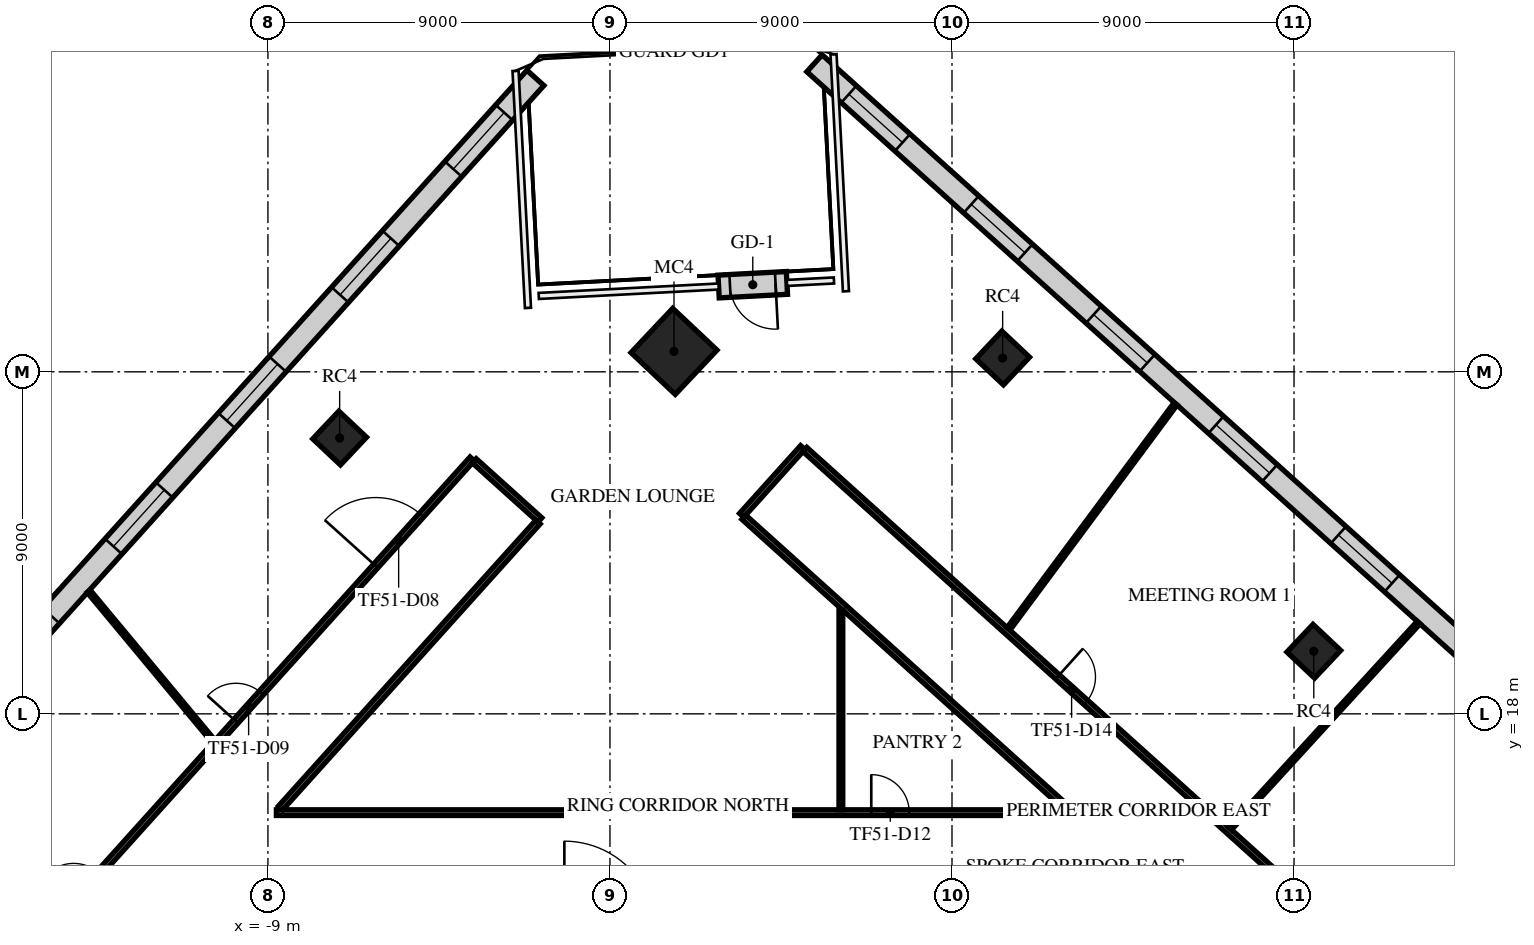
"""IFC4 building model, lengths in metres.
Left out: names, types, materials, properties, quantities, classifications, styles, units other than length and angle.
Written with IfcOpenShell. Run it as: python <this file> out.ifc"""

import sys

from ifc_helpers import new_model, si_unit, direction, frame, frame_2d, origin, origin_2d, place, context, subcontext, project, spatial, rectangle, extrude, element, fill, save


model = new_model("IFC4")
c1 = context("Model", 3, precision=1e-05, world=origin(), true_north=direction((0.0, 1.0)))
c2 = subcontext(c1, "Body", "Model", "MODEL_VIEW")
j1 = project(units=[si_unit("LENGTHUNIT", "METRE"), si_unit("PLANEANGLEUNIT", "RADIAN")], contexts=[c1])
p1 = place(None, origin())
s1 = spatial("IfcSite", under=j1, at=p1, CompositionType="ELEMENT")
p2 = place(p1, origin())
s2 = spatial("IfcBuilding", under=s1, at=p2, CompositionType="ELEMENT")
p3 = place(p2, frame((0.0, 0.0, 217.3)))
s3 = spatial("IfcBuildingStorey", under=s2, at=p3, CompositionType="ELEMENT", Elevation=217.3)
p4 = place(p3, frame((1.685, 27.538, 0.0), z_axis=(0.0, 0.0, 1.0), x_axis=(0.685916152371, 0.727680583715, 0.0)))
e1 = element("IfcColumn", 1, at=p4, inside=s3, PredefinedType="COLUMN", context=c2, shape_type="SweptSolid", body=[
    extrude(rectangle(XDim=1.6, YDim=1.6, at=origin_2d()), origin(), (0.0, 0.0, 1.0), 4.0),
])
for number, where, z_axis, x_axis in (
    (2, (-7.113, 25.257, 0.0), (0.0, 0.0, 1.0), (0.686, 0.728, 0.0)),
    (3, (18.52, 19.647, 0.0), (0.0, 0.0, 1.0), (0.686, 0.728, 0.0)),
    (4, (10.333, 27.364, 0.0), (0.0, 0.0, 1.0), (0.686, 0.728, 0.0)),
):
    element("IfcColumn", number, at=place(p3, frame(where, z_axis=z_axis, x_axis=x_axis)), inside=s3, PredefinedType="COLUMN", context=c2, shape_type="SweptSolid", body=[
        extrude(rectangle(XDim=1.0, YDim=1.0, at=origin_2d()), origin(), (0.0, 0.0, 1.0), 4.0),
    ])
p5 = place(p3, frame((-1.962, 34.735, 0.0), z_axis=(0.0, 0.0, 1.0), x_axis=(-0.669133181838, -0.743142506497, 0.0)))
e5 = element("IfcWall", 5, at=p5, inside=s3, PredefinedType="STANDARD", context=c2, shape_type="SweptSolid", body=[
    extrude(rectangle(XDim=49.0, YDim=0.6, at=frame_2d((24.5, 0.0))), origin(), (0.0, 0.0, 1.0), 3.62),
])
p6 = place(p5, frame((1.227, 0.0, 0.9)))
e6 = element("IfcOpeningElement", 6, at=p6, cuts=e5, PredefinedType="OPENING", context=c2, shape_type="SweptSolid", body=[
    extrude(rectangle(XDim=2.0, YDim=2.1, at=frame_2d((1.0, 1.05))), frame((0.0, 0.31, 0.0), z_axis=(0.0, -1.0, 0.0), x_axis=(1.0, 0.0, 0.0)), (0.0, 0.0, 1.0), 0.62),
])
p7 = place(p5, frame((5.682, 0.0, 0.9)))
e7 = element("IfcOpeningElement", 7, at=p7, cuts=e5, PredefinedType="OPENING", context=c2, shape_type="SweptSolid", body=[
    extrude(rectangle(XDim=2.0, YDim=2.1, at=frame_2d((1.0, 1.05))), frame((0.0, 0.31, 0.0), z_axis=(0.0, -1.0, 0.0), x_axis=(1.0, 0.0, 0.0)), (0.0, 0.0, 1.0), 0.62),
])
p8 = place(p5, frame((10.136, 0.0, 0.9)))
e8 = element("IfcOpeningElement", 8, at=p8, cuts=e5, PredefinedType="OPENING", context=c2, shape_type="SweptSolid", body=[
    extrude(rectangle(XDim=2.0, YDim=2.1, at=frame_2d((1.0, 1.05))), frame((0.0, 0.31, 0.0), z_axis=(0.0, -1.0, 0.0), x_axis=(1.0, 0.0, 0.0)), (0.0, 0.0, 1.0), 0.62),
])
p9 = place(p5, frame((14.591, 0.0, 0.9)))
e9 = element("IfcOpeningElement", 9, at=p9, cuts=e5, PredefinedType="OPENING", context=c2, shape_type="SweptSolid", body=[
    extrude(rectangle(XDim=2.0, YDim=2.1, at=frame_2d((1.0, 1.05))), frame((0.0, 0.31, 0.0), z_axis=(0.0, -1.0, 0.0), x_axis=(1.0, 0.0, 0.0)), (0.0, 0.0, 1.0), 0.62),
])
p10 = place(p5, frame((19.045, 0.0, 0.9)))
e10 = element("IfcOpeningElement", 10, at=p10, cuts=e5, PredefinedType="OPENING", context=c2, shape_type="SweptSolid", body=[
    extrude(rectangle(XDim=2.0, YDim=2.1, at=frame_2d((1.0, 1.05))), frame((0.0, 0.31, 0.0), z_axis=(0.0, -1.0, 0.0), x_axis=(1.0, 0.0, 0.0)), (0.0, 0.0, 1.0), 0.62),
])
p11 = place(p5, frame((23.5, 0.0, 0.9)))
e11 = element("IfcOpeningElement", 11, at=p11, cuts=e5, PredefinedType="OPENING", context=c2, shape_type="SweptSolid", body=[
    extrude(rectangle(XDim=2.0, YDim=2.1, at=frame_2d((1.0, 1.05))), frame((0.0, 0.31, 0.0), z_axis=(0.0, -1.0, 0.0), x_axis=(1.0, 0.0, 0.0)), (0.0, 0.0, 1.0), 0.62),
])
p12 = place(p5, frame((27.955, 0.0, 0.9)))
e12 = element("IfcOpeningElement", 12, at=p12, cuts=e5, PredefinedType="OPENING", context=c2, shape_type="SweptSolid", body=[
    extrude(rectangle(XDim=2.0, YDim=2.1, at=frame_2d((1.0, 1.05))), frame((0.0, 0.31, 0.0), z_axis=(0.0, -1.0, 0.0), x_axis=(1.0, 0.0, 0.0)), (0.0, 0.0, 1.0), 0.62),
])
p13 = place(p5, frame((32.409, 0.0, 0.9)))
e13 = element("IfcOpeningElement", 13, at=p13, cuts=e5, PredefinedType="OPENING", context=c2, shape_type="SweptSolid", body=[
    extrude(rectangle(XDim=2.0, YDim=2.1, at=frame_2d((1.0, 1.05))), frame((0.0, 0.31, 0.0), z_axis=(0.0, -1.0, 0.0), x_axis=(1.0, 0.0, 0.0)), (0.0, 0.0, 1.0), 0.62),
])
p14 = place(p5, frame((36.864, 0.0, 0.9)))
e14 = element("IfcOpeningElement", 14, at=p14, cuts=e5, PredefinedType="OPENING", context=c2, shape_type="SweptSolid", body=[
    extrude(rectangle(XDim=2.0, YDim=2.1, at=frame_2d((1.0, 1.05))), frame((0.0, 0.31, 0.0), z_axis=(0.0, -1.0, 0.0), x_axis=(1.0, 0.0, 0.0)), (0.0, 0.0, 1.0), 0.62),
])
p15 = place(p5, frame((41.318, 0.0, 0.9)))
e15 = element("IfcOpeningElement", 15, at=p15, cuts=e5, PredefinedType="OPENING", context=c2, shape_type="SweptSolid", body=[
    extrude(rectangle(XDim=2.0, YDim=2.1, at=frame_2d((1.0, 1.05))), frame((0.0, 0.31, 0.0), z_axis=(0.0, -1.0, 0.0), x_axis=(1.0, 0.0, 0.0)), (0.0, 0.0, 1.0), 0.62),
])
p16 = place(p5, frame((45.773, 0.0, 0.9)))
e16 = element("IfcOpeningElement", 16, at=p16, cuts=e5, PredefinedType="OPENING", context=c2, shape_type="SweptSolid", body=[
    extrude(rectangle(XDim=2.0, YDim=2.1, at=frame_2d((1.0, 1.05))), frame((0.0, 0.31, 0.0), z_axis=(0.0, -1.0, 0.0), x_axis=(1.0, 0.0, 0.0)), (0.0, 0.0, 1.0), 0.62),
])
p17 = place(p3, frame((34.365, 9.023, 0.0), z_axis=(0.0, 0.0, 1.0), x_axis=(-0.743146896498, 0.66912830625, 0.0)))
e17 = element("IfcWall", 17, at=p17, inside=s3, PredefinedType="STANDARD", context=c2, shape_type="SweptSolid", body=[
    extrude(rectangle(XDim=39.0, YDim=0.6, at=frame_2d((19.5, 0.0))), origin(), (0.0, 0.0, 1.0), 3.62),
])
p18 = place(p17, frame((1.217, 0.0, 0.9)))
e18 = element("IfcOpeningElement", 18, at=p18, cuts=e17, PredefinedType="OPENING", context=c2, shape_type="SweptSolid", body=[
    extrude(rectangle(XDim=1.9, YDim=2.1, at=frame_2d((0.95, 1.05))), frame((0.0, 0.31, 0.0), z_axis=(0.0, -1.0, 0.0), x_axis=(1.0, 0.0, 0.0)), (0.0, 0.0, 1.0), 0.62),
])
p19 = place(p17, frame((5.55, 0.0, 0.9)))
e19 = element("IfcOpeningElement", 19, at=p19, cuts=e17, PredefinedType="OPENING", context=c2, shape_type="SweptSolid", body=[
    extrude(rectangle(XDim=1.9, YDim=2.1, at=frame_2d((0.95, 1.05))), frame((0.0, 0.31, 0.0), z_axis=(0.0, -1.0, 0.0), x_axis=(1.0, 0.0, 0.0)), (0.0, 0.0, 1.0), 0.62),
])
p20 = place(p17, frame((9.883, 0.0, 0.9)))
e20 = element("IfcOpeningElement", 20, at=p20, cuts=e17, PredefinedType="OPENING", context=c2, shape_type="SweptSolid", body=[
    extrude(rectangle(XDim=1.9, YDim=2.1, at=frame_2d((0.95, 1.05))), frame((0.0, 0.31, 0.0), z_axis=(0.0, -1.0, 0.0), x_axis=(1.0, 0.0, 0.0)), (0.0, 0.0, 1.0), 0.62),
])
p21 = place(p17, frame((14.217, 0.0, 0.9)))
e21 = element("IfcOpeningElement", 21, at=p21, cuts=e17, PredefinedType="OPENING", context=c2, shape_type="SweptSolid", body=[
    extrude(rectangle(XDim=1.9, YDim=2.1, at=frame_2d((0.95, 1.05))), frame((0.0, 0.31, 0.0), z_axis=(0.0, -1.0, 0.0), x_axis=(1.0, 0.0, 0.0)), (0.0, 0.0, 1.0), 0.62),
])
p22 = place(p17, frame((18.55, 0.0, 0.9)))
e22 = element("IfcOpeningElement", 22, at=p22, cuts=e17, PredefinedType="OPENING", context=c2, shape_type="SweptSolid", body=[
    extrude(rectangle(XDim=1.9, YDim=2.1, at=frame_2d((0.95, 1.05))), frame((0.0, 0.31, 0.0), z_axis=(0.0, -1.0, 0.0), x_axis=(1.0, 0.0, 0.0)), (0.0, 0.0, 1.0), 0.62),
])
p23 = place(p17, frame((22.883, 0.0, 0.9)))
e23 = element("IfcOpeningElement", 23, at=p23, cuts=e17, PredefinedType="OPENING", context=c2, shape_type="SweptSolid", body=[
    extrude(rectangle(XDim=1.9, YDim=2.1, at=frame_2d((0.95, 1.05))), frame((0.0, 0.31, 0.0), z_axis=(0.0, -1.0, 0.0), x_axis=(1.0, 0.0, 0.0)), (0.0, 0.0, 1.0), 0.62),
])
p24 = place(p17, frame((27.217, 0.0, 0.9)))
e24 = element("IfcOpeningElement", 24, at=p24, cuts=e17, PredefinedType="OPENING", context=c2, shape_type="SweptSolid", body=[
    extrude(rectangle(XDim=1.9, YDim=2.1, at=frame_2d((0.95, 1.05))), frame((0.0, 0.31, 0.0), z_axis=(0.0, -1.0, 0.0), x_axis=(1.0, 0.0, 0.0)), (0.0, 0.0, 1.0), 0.62),
])
p25 = place(p17, frame((31.55, 0.0, 0.9)))
e25 = element("IfcOpeningElement", 25, at=p25, cuts=e17, PredefinedType="OPENING", context=c2, shape_type="SweptSolid", body=[
    extrude(rectangle(XDim=1.9, YDim=2.1, at=frame_2d((0.95, 1.05))), frame((0.0, 0.31, 0.0), z_axis=(0.0, -1.0, 0.0), x_axis=(1.0, 0.0, 0.0)), (0.0, 0.0, 1.0), 0.62),
])
p26 = place(p17, frame((35.883, 0.0, 0.9)))
e26 = element("IfcOpeningElement", 26, at=p26, cuts=e17, PredefinedType="OPENING", context=c2, shape_type="SweptSolid", body=[
    extrude(rectangle(XDim=1.9, YDim=2.1, at=frame_2d((0.95, 1.05))), frame((0.0, 0.31, 0.0), z_axis=(0.0, -1.0, 0.0), x_axis=(1.0, 0.0, 0.0)), (0.0, 0.0, 1.0), 0.62),
])
p27 = place(p3, frame((4.656, 29.339, 0.0), z_axis=(0.0, 0.0, 1.0), x_axis=(-0.998635754819, -0.052217135082, 0.0)))
e27 = element("IfcWall", 27, at=p27, inside=s3, PredefinedType="STANDARD", context=c2, shape_type="SweptSolid", body=[
    extrude(rectangle(XDim=1.8, YDim=0.6, at=frame_2d((0.9, 0.0))), origin(), (0.0, 0.0, 1.0), 3.62),
])
p28 = place(p27, frame((0.3, 0.0, 0.0)))
e28 = element("IfcOpeningElement", 28, at=p28, cuts=e27, PredefinedType="OPENING", context=c2, shape_type="SweptSolid", body=[
    extrude(rectangle(XDim=1.2, YDim=2.4, at=frame_2d((0.6, 1.2))), frame((0.0, 0.31, 0.0), z_axis=(0.0, -1.0, 0.0), x_axis=(1.0, 0.0, 0.0)), (0.0, 0.0, 1.0), 0.62),
])
p29 = place(p3, frame((-24.952, 1.024, 0.0), z_axis=(0.0, 0.0, 1.0), x_axis=(0.66912723064, 0.743147864974, 0.0)))
e29 = element("IfcWall", 29, at=p29, inside=s3, PredefinedType="PARTITIONING", context=c2, shape_type="SweptSolid", body=[
    extrude(rectangle(XDim=31.871, YDim=0.15, at=frame_2d((15.936, 0.0))), origin(), (0.0, 0.0, 1.0), 3.17),
])
p30 = place(p29, frame((16.202, 0.0, 0.0)))
e30 = element("IfcOpeningElement", 30, at=p30, cuts=e29, PredefinedType="OPENING", context=c2, shape_type="SweptSolid", body=[
    extrude(rectangle(XDim=1.0, YDim=2.1, at=frame_2d((0.5, 1.05))), frame((0.0, 0.085, 0.0), z_axis=(0.0, -1.0, 0.0), x_axis=(1.0, 0.0, 0.0)), (0.0, 0.0, 1.0), 0.17),
])
p31 = place(p29, frame((28.08, 0.0, 0.0)))
e31 = element("IfcOpeningElement", 31, at=p31, cuts=e29, PredefinedType="OPENING", context=c2, shape_type="SweptSolid", body=[
    extrude(rectangle(XDim=1.8, YDim=2.1, at=frame_2d((0.9, 1.05))), frame((0.0, 0.085, 0.0), z_axis=(0.0, -1.0, 0.0), x_axis=(1.0, 0.0, 0.0)), (0.0, 0.0, 1.0), 0.17),
])
p32 = place(p29, frame((22.58, 0.0, 0.0)))
e32 = element("IfcOpeningElement", 32, at=p32, cuts=e29, PredefinedType="OPENING", context=c2, shape_type="SweptSolid", body=[
    extrude(rectangle(XDim=1.0, YDim=2.1, at=frame_2d((0.5, 1.05))), frame((0.0, 0.085, 0.0), z_axis=(0.0, -1.0, 0.0), x_axis=(1.0, 0.0, 0.0)), (0.0, 0.0, 1.0), 0.17),
])
p33 = place(p3, frame((-8.778, 15.4, 0.0), z_axis=(0.0, 0.0, 1.0), x_axis=(1.0, 0.0, 0.0)))
e33 = element("IfcWall", 33, at=p33, inside=s3, PredefinedType="PARTITIONING", context=c2, shape_type="SweptSolid", body=[
    extrude(rectangle(XDim=20.934, YDim=0.15, at=frame_2d((10.467, 0.0))), origin(), (0.0, 0.0, 1.0), 3.17),
])
p34 = place(p33, frame((15.654, 0.0, 0.0)))
e34 = element("IfcOpeningElement", 34, at=p34, cuts=e33, PredefinedType="OPENING", context=c2, shape_type="SweptSolid", body=[
    extrude(rectangle(XDim=1.0, YDim=2.1, at=frame_2d((0.5, 1.05))), frame((0.0, 0.085, 0.0), z_axis=(0.0, -1.0, 0.0), x_axis=(1.0, 0.0, 0.0)), (0.0, 0.0, 1.0), 0.17),
])
p35 = place(p3, frame((-8.665, 15.525, 0.0), z_axis=(0.0, 0.0, 1.0), x_axis=(0.669084664521, 0.743186189123, 0.0)))
e35 = element("IfcWall", 35, at=p35, inside=s3, PredefinedType="PARTITIONING", context=c2, shape_type="SweptSolid", body=[
    extrude(rectangle(XDim=10.121, YDim=0.15, at=frame_2d((5.061, 0.0))), origin(), (0.0, 0.0, 1.0), 3.17),
])
p36 = place(p3, frame((-3.57, 24.659, 0.0), z_axis=(0.0, 0.0, 1.0), x_axis=(0.743059097408, -0.669225804761, 0.0)))
e36 = element("IfcWall", 36, at=p36, inside=s3, PredefinedType="PARTITIONING", context=c2, shape_type="SweptSolid", body=[
    extrude(rectangle(XDim=2.324, YDim=0.15, at=frame_2d((1.162, 0.0))), origin(), (0.0, 0.0, 1.0), 3.17),
])
p37 = place(p3, frame((3.466, 23.224, 0.0), z_axis=(0.0, 0.0, 1.0), x_axis=(0.669060256522, 0.743208162726, 0.0)))
e37 = element("IfcWall", 37, at=p37, inside=s3, PredefinedType="PARTITIONING", context=c2, shape_type="SweptSolid", body=[
    extrude(rectangle(XDim=2.4, YDim=0.15, at=frame_2d((1.2, 0.0))), origin(), (0.0, 0.0, 1.0), 3.62),
])
p38 = place(p3, frame((3.522, 23.174, 0.0), z_axis=(0.0, 0.0, 1.0), x_axis=(0.743165539408, -0.669107600492, 0.0)))
e38 = element("IfcWall", 38, at=p38, inside=s3, PredefinedType="PARTITIONING", context=c2, shape_type="SweptSolid", body=[
    extrude(rectangle(XDim=11.423, YDim=0.15, at=frame_2d((5.711, 0.0))), origin(), (0.0, 0.0, 1.0), 3.17),
])
p39 = place(p3, frame((5.128, 24.958, 0.0), z_axis=(0.0, 0.0, 1.0), x_axis=(0.743144813636, -0.66913061951, 0.0)))
e39 = element("IfcWall", 39, at=p39, inside=s3, PredefinedType="PARTITIONING", context=c2, shape_type="SweptSolid", body=[
    extrude(rectangle(XDim=25.854, YDim=0.15, at=frame_2d((12.927, 0.0))), origin(), (0.0, 0.0, 1.0), 3.17),
])
p40 = place(p39, frame((8.946, 0.0, 0.0)))
e40 = element("IfcOpeningElement", 40, at=p40, cuts=e39, PredefinedType="OPENING", context=c2, shape_type="SweptSolid", body=[
    extrude(rectangle(XDim=1.0, YDim=2.1, at=frame_2d((0.5, 1.05))), frame((0.0, 0.085, 0.0), z_axis=(0.0, -1.0, 0.0), x_axis=(1.0, 0.0, 0.0)), (0.0, 0.0, 1.0), 0.17),
])
p41 = place(p39, frame((20.29, 0.0, 0.0)))
e41 = element("IfcOpeningElement", 41, at=p41, cuts=e39, PredefinedType="OPENING", context=c2, shape_type="SweptSolid", body=[
    extrude(rectangle(XDim=1.8, YDim=2.1, at=frame_2d((0.9, 1.05))), frame((0.0, 0.085, 0.0), z_axis=(0.0, -1.0, 0.0), x_axis=(1.0, 0.0, 0.0)), (0.0, 0.0, 1.0), 0.17),
])
p42 = place(p3, frame((-13.717, 21.228, 0.0), z_axis=(0.0, 0.0, 1.0), x_axis=(0.639202955897, -0.769038088246, 0.0)))
e42 = element("IfcWall", 42, at=p42, inside=s3, PredefinedType="PARTITIONING", context=c2, shape_type="SweptSolid", body=[
    extrude(rectangle(XDim=5.141, YDim=0.1, at=frame_2d((2.57, 0.0))), origin(), (0.0, 0.0, 1.0), 2.97),
])
p43 = place(p3, frame((6.076, 15.475, 0.0), z_axis=(0.0, 0.0, 1.0), x_axis=(0.0, 1.0, 0.0)))
e43 = element("IfcWall", 43, at=p43, inside=s3, PredefinedType="PARTITIONING", context=c2, shape_type="SweptSolid", body=[
    extrude(rectangle(XDim=5.253, YDim=0.1, at=frame_2d((2.626, 0.0))), origin(), (0.0, 0.0, 1.0), 3.17),
])
p44 = place(p3, frame((10.489, 20.238, 0.0), z_axis=(0.0, 0.0, 1.0), x_axis=(0.595992284238, 0.802990160045, 0.0)))
e44 = element("IfcWall", 44, at=p44, inside=s3, PredefinedType="PARTITIONING", context=c2, shape_type="SweptSolid", body=[
    extrude(rectangle(XDim=7.373, YDim=0.1, at=frame_2d((3.686, 0.0))), origin(), (0.0, 0.0, 1.0), 2.97),
])
p45 = place(p3, frame((16.319, 14.983, 0.0), z_axis=(0.0, 0.0, 1.0), x_axis=(0.675134344503, 0.737694799272, 0.0)))
e45 = element("IfcWall", 45, at=p45, inside=s3, PredefinedType="PARTITIONING", context=c2, shape_type="SweptSolid", body=[
    extrude(rectangle(XDim=7.344, YDim=0.1, at=frame_2d((3.672, 0.0))), origin(), (0.0, 0.0, 1.0), 2.97),
])
p46 = place(p6, origin())
e46 = element("IfcWindow", 46, at=p46, inside=s3, PartitioningType="SINGLE_PANEL", PredefinedType="WINDOW", context=c2, shape_type="SweptSolid", body=[
    extrude(rectangle(XDim=2.0, YDim=2.1, at=frame_2d((1.0, 1.05))), frame((0.0, 0.03, 0.0), z_axis=(0.0, -1.0, 0.0), x_axis=(1.0, 0.0, 0.0)), (0.0, 0.0, 1.0), 0.06),
])
fill(e6, e46)
p47 = place(p7, origin())
e47 = element("IfcWindow", 47, at=p47, inside=s3, PartitioningType="SINGLE_PANEL", PredefinedType="WINDOW", context=c2, shape_type="SweptSolid", body=[
    extrude(rectangle(XDim=2.0, YDim=2.1, at=frame_2d((1.0, 1.05))), frame((0.0, 0.03, 0.0), z_axis=(0.0, -1.0, 0.0), x_axis=(1.0, 0.0, 0.0)), (0.0, 0.0, 1.0), 0.06),
])
fill(e7, e47)
p48 = place(p8, origin())
e48 = element("IfcWindow", 48, at=p48, inside=s3, PartitioningType="SINGLE_PANEL", PredefinedType="WINDOW", context=c2, shape_type="SweptSolid", body=[
    extrude(rectangle(XDim=2.0, YDim=2.1, at=frame_2d((1.0, 1.05))), frame((0.0, 0.03, 0.0), z_axis=(0.0, -1.0, 0.0), x_axis=(1.0, 0.0, 0.0)), (0.0, 0.0, 1.0), 0.06),
])
fill(e8, e48)
p49 = place(p9, origin())
e49 = element("IfcWindow", 49, at=p49, inside=s3, PartitioningType="SINGLE_PANEL", PredefinedType="WINDOW", context=c2, shape_type="SweptSolid", body=[
    extrude(rectangle(XDim=2.0, YDim=2.1, at=frame_2d((1.0, 1.05))), frame((0.0, 0.03, 0.0), z_axis=(0.0, -1.0, 0.0), x_axis=(1.0, 0.0, 0.0)), (0.0, 0.0, 1.0), 0.06),
])
fill(e9, e49)
p50 = place(p22, origin())
e50 = element("IfcWindow", 50, at=p50, inside=s3, PartitioningType="SINGLE_PANEL", PredefinedType="WINDOW", context=c2, shape_type="SweptSolid", body=[
    extrude(rectangle(XDim=1.9, YDim=2.1, at=frame_2d((0.95, 1.05))), frame((0.0, 0.03, 0.0), z_axis=(0.0, -1.0, 0.0), x_axis=(1.0, 0.0, 0.0)), (0.0, 0.0, 1.0), 0.06),
])
fill(e22, e50)
p51 = place(p23, origin())
e51 = element("IfcWindow", 51, at=p51, inside=s3, PartitioningType="SINGLE_PANEL", PredefinedType="WINDOW", context=c2, shape_type="SweptSolid", body=[
    extrude(rectangle(XDim=1.9, YDim=2.1, at=frame_2d((0.95, 1.05))), frame((0.0, 0.03, 0.0), z_axis=(0.0, -1.0, 0.0), x_axis=(1.0, 0.0, 0.0)), (0.0, 0.0, 1.0), 0.06),
])
fill(e23, e51)
p52 = place(p24, origin())
e52 = element("IfcWindow", 52, at=p52, inside=s3, PartitioningType="SINGLE_PANEL", PredefinedType="WINDOW", context=c2, shape_type="SweptSolid", body=[
    extrude(rectangle(XDim=1.9, YDim=2.1, at=frame_2d((0.95, 1.05))), frame((0.0, 0.03, 0.0), z_axis=(0.0, -1.0, 0.0), x_axis=(1.0, 0.0, 0.0)), (0.0, 0.0, 1.0), 0.06),
])
fill(e24, e52)
p53 = place(p25, origin())
e53 = element("IfcWindow", 53, at=p53, inside=s3, PartitioningType="SINGLE_PANEL", PredefinedType="WINDOW", context=c2, shape_type="SweptSolid", body=[
    extrude(rectangle(XDim=1.9, YDim=2.1, at=frame_2d((0.95, 1.05))), frame((0.0, 0.03, 0.0), z_axis=(0.0, -1.0, 0.0), x_axis=(1.0, 0.0, 0.0)), (0.0, 0.0, 1.0), 0.06),
])
fill(e25, e53)
p54 = place(p26, origin())
e54 = element("IfcWindow", 54, at=p54, inside=s3, PartitioningType="SINGLE_PANEL", PredefinedType="WINDOW", context=c2, shape_type="SweptSolid", body=[
    extrude(rectangle(XDim=1.9, YDim=2.1, at=frame_2d((0.95, 1.05))), frame((0.0, 0.03, 0.0), z_axis=(0.0, -1.0, 0.0), x_axis=(1.0, 0.0, 0.0)), (0.0, 0.0, 1.0), 0.06),
])
fill(e26, e54)
p55 = place(p28, origin())
e55 = element("IfcDoor", 55, at=p55, inside=s3, OperationType="SINGLE_SWING_LEFT", PredefinedType="DOOR", context=c2, shape_type="SweptSolid", body=[
    extrude(rectangle(XDim=1.2, YDim=2.4, at=frame_2d((0.6, 1.2))), frame((0.0, 0.025, 0.0), z_axis=(0.0, -1.0, 0.0), x_axis=(1.0, 0.0, 0.0)), (0.0, 0.0, 1.0), 0.05),
])
fill(e28, e55)
p56 = place(p31, origin())
e56 = element("IfcDoor", 56, at=p56, inside=s3, OperationType="DOUBLE_DOOR_SINGLE_SWING", PredefinedType="DOOR", context=c2, shape_type="SweptSolid", body=[
    extrude(rectangle(XDim=1.8, YDim=2.1, at=frame_2d((0.9, 1.05))), frame((0.0, 0.025, 0.0), z_axis=(0.0, -1.0, 0.0), x_axis=(1.0, 0.0, 0.0)), (0.0, 0.0, 1.0), 0.05),
])
fill(e31, e56)
p57 = place(p32, origin())
e57 = element("IfcDoor", 57, at=p57, inside=s3, OperationType="SINGLE_SWING_RIGHT", PredefinedType="DOOR", context=c2, shape_type="SweptSolid", body=[
    extrude(rectangle(XDim=1.0, YDim=2.1, at=frame_2d((0.5, 1.05))), frame((0.0, 0.025, 0.0), z_axis=(0.0, -1.0, 0.0), x_axis=(1.0, 0.0, 0.0)), (0.0, 0.0, 1.0), 0.05),
])
fill(e32, e57)
p58 = place(p34, origin())
e58 = element("IfcDoor", 58, at=p58, inside=s3, OperationType="SINGLE_SWING_LEFT", PredefinedType="DOOR", context=c2, shape_type="SweptSolid", body=[
    extrude(rectangle(XDim=1.0, YDim=2.1, at=frame_2d((0.5, 1.05))), frame((0.0, 0.025, 0.0), z_axis=(0.0, -1.0, 0.0), x_axis=(1.0, 0.0, 0.0)), (0.0, 0.0, 1.0), 0.05),
])
fill(e34, e58)
p59 = place(p40, origin())
e59 = element("IfcDoor", 59, at=p59, inside=s3, OperationType="SINGLE_SWING_RIGHT", PredefinedType="DOOR", context=c2, shape_type="SweptSolid", body=[
    extrude(rectangle(XDim=1.0, YDim=2.1, at=frame_2d((0.5, 1.05))), frame((0.0, 0.025, 0.0), z_axis=(0.0, -1.0, 0.0), x_axis=(1.0, 0.0, 0.0)), (0.0, 0.0, 1.0), 0.05),
])
fill(e40, e59)
save(model, sys.argv[1])
